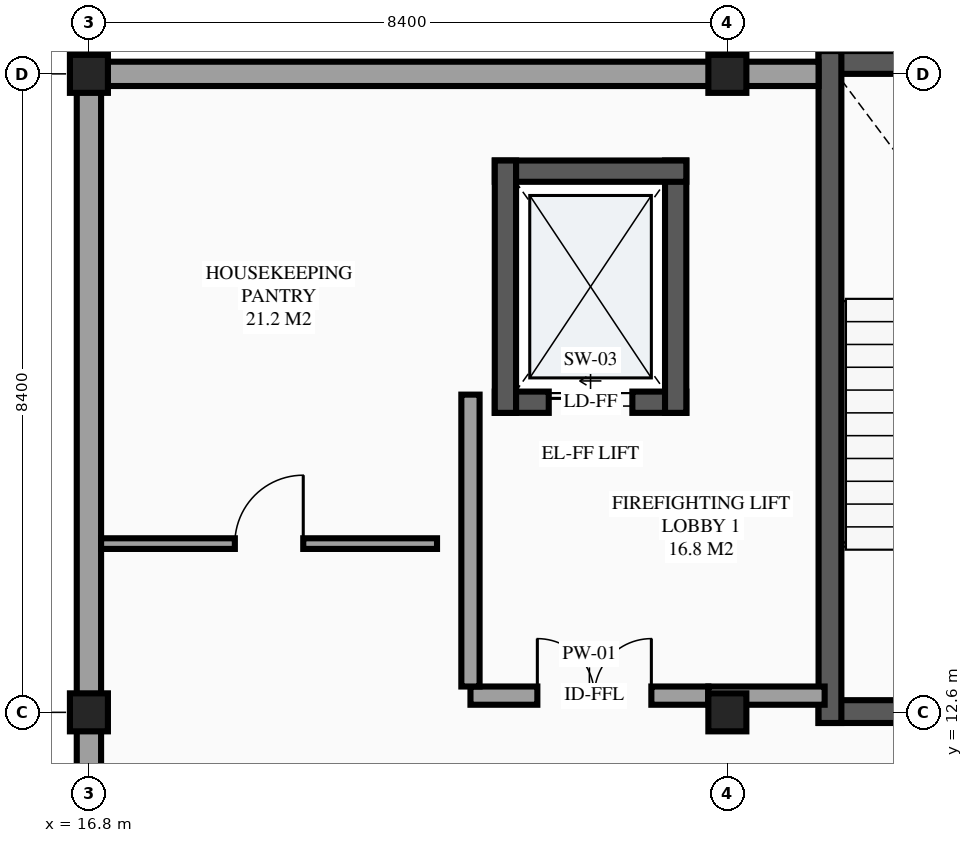
"""IFC4 building model, lengths in metres.
Left out: names, types, materials, properties, quantities, classifications, styles, units other than length and angle.
Written with IfcOpenShell. Run it as: python <this file> out.ifc"""

import sys

from ifc_helpers import new_model, si_unit, direction, frame, frame_2d, origin, origin_2d, place, context, subcontext, project, spatial, rectangle, extrude, element, fill, save


model = new_model("IFC4")
c1 = context("Model", 3, precision=1e-05, world=origin(), true_north=direction((0.0, 1.0)))
c2 = subcontext(c1, "Body", "Model", "MODEL_VIEW")
j1 = project(units=[si_unit("LENGTHUNIT", "METRE"), si_unit("PLANEANGLEUNIT", "RADIAN")], contexts=[c1])
p1 = place(None, origin())
s1 = spatial("IfcSite", under=j1, at=p1, CompositionType="ELEMENT")
p2 = place(p1, origin())
s2 = spatial("IfcBuilding", under=s1, at=p2, CompositionType="ELEMENT")
p3 = place(p2, frame((0.0, 0.0, 39.9)))
s3 = spatial("IfcBuildingStorey", under=s2, at=p3, CompositionType="ELEMENT", Elevation=39.9)
for number, where, z_axis, x_axis in (
    (1, (16.8, 12.6, 0.0), (0.0, 0.0, 1.0), (1.0, 0.0, 0.0)),
    (2, (16.8, 21.0, 0.0), (0.0, 0.0, 1.0), (1.0, 0.0, 0.0)),
    (3, (25.2, 12.6, 0.0), (0.0, 0.0, 1.0), (1.0, 0.0, 0.0)),
    (4, (25.2, 21.0, 0.0), (0.0, 0.0, 1.0), (1.0, 0.0, 0.0)),
):
    element("IfcColumn", number, at=place(p3, frame(where, z_axis=z_axis, x_axis=x_axis)), inside=s3, PredefinedType="COLUMN", context=c2, shape_type="SweptSolid", body=[
        extrude(rectangle(XDim=0.5, YDim=0.5, at=origin_2d()), origin(), (0.0, 0.0, 1.0), 3.6),
    ])
p4 = place(p3, frame((25.2, 21.0, 0.0), z_axis=(0.0, 0.0, 1.0), x_axis=(-1.0, 0.0, 0.0)))
e5 = element("IfcWall", 5, at=p4, inside=s3, PredefinedType="STANDARD", context=c2, shape_type="SweptSolid", body=[
    extrude(rectangle(XDim=8.4, YDim=0.32, at=frame_2d((4.2, 0.0))), origin(), (0.0, 0.0, 1.0), 3.126),
])
p5 = place(p3, frame((16.8, 21.0, 0.0), z_axis=(0.0, 0.0, 1.0), x_axis=(0.0, -1.0, 0.0)))
e6 = element("IfcWall", 6, at=p5, inside=s3, PredefinedType="STANDARD", context=c2, shape_type="SweptSolid", body=[
    extrude(rectangle(XDim=11.0, YDim=0.32, at=frame_2d((5.5, 0.0))), origin(), (0.0, 0.0, 1.0), 2.48),
])
p6 = place(p3, frame((22.14, 16.68, 0.0), z_axis=(0.0, 0.0, 1.0), x_axis=(1.0, 0.0, 0.0)))
e7 = element("IfcWall", 7, at=p6, inside=s3, PredefinedType="SHEAR", context=c2, shape_type="SweptSolid", body=[
    extrude(rectangle(XDim=2.52, YDim=0.28, at=frame_2d((1.26, 0.0))), origin(), (0.0, 0.0, 1.0), 3.6),
])
p7 = place(p6, frame((0.71, 0.0, 0.0)))
e8 = element("IfcOpeningElement", 8, at=p7, cuts=e7, PredefinedType="OPENING", context=c2, shape_type="SweptSolid", body=[
    extrude(rectangle(XDim=1.1, YDim=2.2, at=frame_2d((0.55, 1.1))), frame((0.0, 0.15, 0.0), z_axis=(0.0, -1.0, 0.0), x_axis=(1.0, 0.0, 0.0)), (0.0, 0.0, 1.0), 0.3),
])
p8 = place(p3, frame((24.52, 16.54, 0.0), z_axis=(0.0, 0.0, 1.0), x_axis=(0.0, 1.0, 0.0)))
e9 = element("IfcWall", 9, at=p8, inside=s3, PredefinedType="SHEAR", context=c2, shape_type="SweptSolid", body=[
    extrude(rectangle(XDim=3.32, YDim=0.28, at=frame_2d((1.66, 0.0))), origin(), (0.0, 0.0, 1.0), 3.6),
])
p9 = place(p3, frame((24.66, 19.72, 0.0), z_axis=(0.0, 0.0, 1.0), x_axis=(-1.0, 0.0, 0.0)))
e10 = element("IfcWall", 10, at=p9, inside=s3, PredefinedType="SHEAR", context=c2, shape_type="SweptSolid", body=[
    extrude(rectangle(XDim=2.52, YDim=0.28, at=frame_2d((1.26, 0.0))), origin(), (0.0, 0.0, 1.0), 3.6),
])
p10 = place(p3, frame((22.28, 19.86, 0.0), z_axis=(0.0, 0.0, 1.0), x_axis=(0.0, -1.0, 0.0)))
e11 = element("IfcWall", 11, at=p10, inside=s3, PredefinedType="SHEAR", context=c2, shape_type="SweptSolid", body=[
    extrude(rectangle(XDim=3.32, YDim=0.28, at=frame_2d((1.66, 0.0))), origin(), (0.0, 0.0, 1.0), 3.6),
])
p11 = place(p3, frame((26.4, 12.61, 0.0), z_axis=(0.0, 0.0, 1.0), x_axis=(1.0, 0.0, 0.0)))
e12 = element("IfcWall", 12, at=p11, inside=s3, PredefinedType="SHEAR", context=c2, shape_type="SweptSolid", body=[
    extrude(rectangle(XDim=5.2, YDim=0.3, at=frame_2d((2.6, 0.0))), origin(), (0.0, 0.0, 1.0), 3.6),
])
p12 = place(p11, frame((2.025, 0.0, 0.0)))
e13 = element("IfcOpeningElement", 13, at=p12, cuts=e12, PredefinedType="OPENING", context=c2, shape_type="SweptSolid", body=[
    extrude(rectangle(XDim=1.15, YDim=2.15, at=frame_2d((0.575, 1.075))), frame((0.0, 0.16, 0.0), z_axis=(0.0, -1.0, 0.0), x_axis=(1.0, 0.0, 0.0)), (0.0, 0.0, 1.0), 0.32),
])
p13 = place(p3, frame((31.6, 21.15, 0.0), z_axis=(0.0, 0.0, 1.0), x_axis=(-1.0, 0.0, 0.0)))
e14 = element("IfcWall", 14, at=p13, inside=s3, PredefinedType="SHEAR", context=c2, shape_type="SweptSolid", body=[
    extrude(rectangle(XDim=5.2, YDim=0.3, at=frame_2d((2.6, 0.0))), origin(), (0.0, 0.0, 1.0), 3.6),
])
p14 = place(p3, frame((26.55, 21.3, 0.0), z_axis=(0.0, 0.0, 1.0), x_axis=(0.0, -1.0, 0.0)))
e15 = element("IfcWall", 15, at=p14, inside=s3, PredefinedType="SHEAR", context=c2, shape_type="SweptSolid", body=[
    extrude(rectangle(XDim=8.84, YDim=0.3, at=frame_2d((4.42, 0.0))), origin(), (0.0, 0.0, 1.0), 3.6),
])
p15 = place(p3, frame((21.82, 12.82, 0.0), z_axis=(0.0, 0.0, 1.0), x_axis=(1.0, 0.0, 0.0)))
e16 = element("IfcWall", 16, at=p15, inside=s3, PredefinedType="PARTITIONING", context=c2, shape_type="SweptSolid", body=[
    extrude(rectangle(XDim=3.13, YDim=0.24, at=frame_2d((1.565, 0.0))), origin(), (0.0, 0.0, 1.0), 2.73),
])
p16 = place(p15, frame((0.88, 0.0, 0.0)))
e17 = element("IfcOpeningElement", 17, at=p16, cuts=e16, PredefinedType="OPENING", context=c2, shape_type="SweptSolid", body=[
    extrude(rectangle(XDim=1.5, YDim=2.15, at=frame_2d((0.75, 1.075))), frame((0.0, 0.13, 0.0), z_axis=(0.0, -1.0, 0.0), x_axis=(1.0, 0.0, 0.0)), (0.0, 0.0, 1.0), 0.26),
])
p17 = place(p3, frame((21.82, 12.94, 0.0), z_axis=(0.0, 0.0, 1.0), x_axis=(0.0, 1.0, 0.0)))
e18 = element("IfcWall", 18, at=p17, inside=s3, PredefinedType="PARTITIONING", context=c2, shape_type="SweptSolid", body=[
    extrude(rectangle(XDim=3.84, YDim=0.24, at=frame_2d((1.92, 0.0))), origin(), (0.0, 0.0, 1.0), 3.375),
])
p18 = place(p3, frame((16.96, 14.82, 0.0), z_axis=(0.0, 0.0, 1.0), x_axis=(1.0, 0.0, 0.0)))
e19 = element("IfcWall", 19, at=p18, inside=s3, PredefinedType="PARTITIONING", context=c2, shape_type="SweptSolid", body=[
    extrude(rectangle(XDim=4.42, YDim=0.14, at=frame_2d((2.21, 0.0))), origin(), (0.0, 0.0, 1.0), 3.375),
])
p19 = place(p18, frame((1.76, 0.0, 0.0)))
e20 = element("IfcOpeningElement", 20, at=p19, cuts=e19, PredefinedType="OPENING", context=c2, shape_type="SweptSolid", body=[
    extrude(rectangle(XDim=0.9, YDim=2.12, at=frame_2d((0.45, 1.06))), frame((0.0, 0.08, 0.0), z_axis=(0.0, -1.0, 0.0), x_axis=(1.0, 0.0, 0.0)), (0.0, 0.0, 1.0), 0.16),
])
p20 = place(p3, frame((26.4, 21.0, 0.0), z_axis=(0.0, 0.0, 1.0), x_axis=(-1.0, 0.0, 0.0)))
e21 = element("IfcWall", 21, at=p20, inside=s3, PredefinedType="STANDARD", context=c2, shape_type="SweptSolid", body=[
    extrude(rectangle(XDim=1.2, YDim=0.32, at=frame_2d((0.6, 0.0))), origin(), (0.0, 0.0, 1.0), 2.43),
])
p21 = place(p3, frame((24.95, 12.82, 0.0), z_axis=(0.0, 0.0, 1.0), x_axis=(1.0, 0.0, 0.0)))
e22 = element("IfcWall", 22, at=p21, inside=s3, PredefinedType="PARTITIONING", context=c2, shape_type="SweptSolid", body=[
    extrude(rectangle(XDim=1.53, YDim=0.24, at=frame_2d((0.765, 0.0))), origin(), (0.0, 0.0, 1.0), 3.375),
])
p22 = place(p7, origin())
e23 = element("IfcDoor", 23, at=p22, inside=s3, OperationType="SLIDING_TO_LEFT", PredefinedType="DOOR", context=c2, shape_type="SweptSolid", body=[
    extrude(rectangle(XDim=1.1, YDim=2.2, at=frame_2d((0.55, 1.1))), frame((0.0, 0.025, 0.0), z_axis=(0.0, -1.0, 0.0), x_axis=(1.0, 0.0, 0.0)), (0.0, 0.0, 1.0), 0.05),
])
fill(e8, e23)
p23 = place(p16, origin())
e24 = element("IfcDoor", 24, at=p23, inside=s3, OperationType="DOUBLE_DOOR_SINGLE_SWING", PredefinedType="DOOR", context=c2, shape_type="SweptSolid", body=[
    extrude(rectangle(XDim=1.5, YDim=2.15, at=frame_2d((0.75, 1.075))), frame((0.0, 0.025, 0.0), z_axis=(0.0, -1.0, 0.0), x_axis=(1.0, 0.0, 0.0)), (0.0, 0.0, 1.0), 0.05),
])
fill(e17, e24)
p24 = place(p19, origin())
e25 = element("IfcDoor", 25, at=p24, inside=s3, OperationType="SINGLE_SWING_RIGHT", PredefinedType="DOOR", context=c2, shape_type="SweptSolid", body=[
    extrude(rectangle(XDim=0.9, YDim=2.12, at=frame_2d((0.45, 1.06))), frame((0.0, 0.025, 0.0), z_axis=(0.0, -1.0, 0.0), x_axis=(1.0, 0.0, 0.0)), (0.0, 0.0, 1.0), 0.05),
])
fill(e20, e25)
save(model, sys.argv[1])
